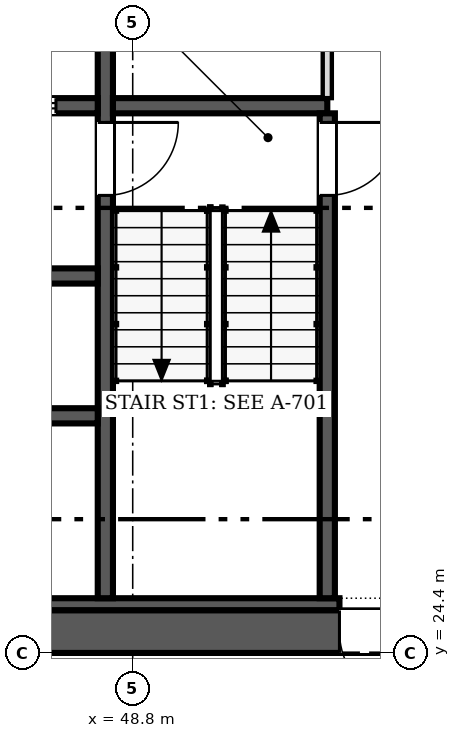
"""IFC4 building model, lengths in metres.
Left out: names, types, materials, properties, quantities, classifications, styles, units other than length and angle.
Written with IfcOpenShell. Run it as: python <this file> out.ifc"""

import sys

from ifc_helpers import new_model, si_unit, direction, frame, frame_2d, origin, place, context, subcontext, project, spatial, rectangle, extrude, source, transform, mapped, element, fill, save


model = new_model("IFC4")
c1 = context("Model", 3, precision=1e-05, world=origin(), true_north=direction((0.0, 1.0)))
c2 = subcontext(c1, "Body", "Model", "MODEL_VIEW")
j1 = project(units=[si_unit("LENGTHUNIT", "METRE"), si_unit("PLANEANGLEUNIT", "RADIAN")], contexts=[c1])
p1 = place(None, origin())
s1 = spatial("IfcSite", under=j1, at=p1, CompositionType="ELEMENT")
p2 = place(p1, origin())
s2 = spatial("IfcBuilding", under=s1, at=p2, CompositionType="ELEMENT")
p3 = place(p2, frame((0.0, 0.0, 139.2)))
s3 = spatial("IfcBuildingStorey", under=s2, at=p3, CompositionType="ELEMENT", Elevation=139.2)
p4 = place(p3, frame((54.9, 24.75, 0.0), z_axis=(0.0, 0.0, 1.0), x_axis=(-1.0, 0.0, 0.0)))
e1 = element("IfcWall", 1, at=p4, inside=s3, PredefinedType="SHEAR", context=c2, shape_type="SweptSolid", body=[
    extrude(rectangle(XDim=24.4, YDim=0.7, at=frame_2d((12.2, 0.0))), origin(), (0.0, 0.0, 1.0), 3.8),
])
m1 = source(origin(), c2, "Body", "SweptSolid", [
    extrude(rectangle(XDim=1.2, YDim=2.1, at=frame_2d((0.6, 1.05))), frame((0.0, 0.36, 0.0), z_axis=(0.0, -1.0, 0.0), x_axis=(1.0, 0.0, 0.0)), (0.0, 0.0, 1.0), 0.72),
])
p5 = place(p4, frame((1.5, 0.0, 0.0)))
e2 = element("IfcOpeningElement", 2, at=p5, cuts=e1, PredefinedType="OPENING", context=c2, shape_type="MappedRepresentation", body=[
    mapped(m1, transform((0.0, 0.0, 0.0), scale=1.0)),
])
p6 = place(p3, frame((31.2, 25.2, 0.0), z_axis=(0.0, 0.0, 1.0), x_axis=(1.0, 0.0, 0.0)))
e3 = element("IfcWall", 3, at=p6, inside=s3, PredefinedType="SOLIDWALL", context=c2, shape_type="SweptSolid", body=[
    extrude(rectangle(XDim=21.0, YDim=0.2, at=frame_2d((10.5, 0.0))), origin(), (0.0, 0.0, 1.0), 3.8),
])
p7 = place(p3, frame((48.35, 36.35, 0.0), z_axis=(0.0, 0.0, 1.0), x_axis=(0.0, -1.0, 0.0)))
e4 = element("IfcWall", 4, at=p7, inside=s3, PredefinedType="SOLIDWALL", context=c2, shape_type="SweptSolid", body=[
    extrude(rectangle(XDim=11.05, YDim=0.25, at=frame_2d((5.525, 0.0))), origin(), (0.0, 0.0, 1.0), 3.8),
])
m2 = source(origin(), c2, "Body", "SweptSolid", [
    extrude(rectangle(XDim=1.2, YDim=2.1, at=frame_2d((0.6, 1.05))), frame((0.0, 0.135, 0.0), z_axis=(0.0, -1.0, 0.0), x_axis=(1.0, 0.0, 0.0)), (0.0, 0.0, 1.0), 0.27),
])
p8 = place(p7, frame((3.225, 0.0, 0.0)))
e5 = element("IfcOpeningElement", 5, at=p8, cuts=e4, PredefinedType="OPENING", context=c2, shape_type="MappedRepresentation", body=[
    mapped(m2, transform((0.0, 0.0, 0.0), scale=1.0)),
])
p9 = place(p3, frame((48.225, 33.4, 0.0), z_axis=(0.0, 0.0, 1.0), x_axis=(-1.0, 0.0, 0.0)))
e6 = element("IfcWall", 6, at=p9, inside=s3, PredefinedType="SOLIDWALL", context=c2, shape_type="SweptSolid", body=[
    extrude(rectangle(XDim=5.275, YDim=0.25, at=frame_2d((2.638, 0.0))), origin(), (0.0, 0.0, 1.0), 3.8),
])
p10 = place(p9, frame((3.512, 0.0, 0.0)))
e7 = element("IfcOpeningElement", 7, at=p10, cuts=e6, PredefinedType="OPENING", context=c2, shape_type="MappedRepresentation", body=[
    mapped(m2, transform((0.0, 0.0, 0.0), scale=1.0)),
])
p11 = place(p9, frame((0.688, 0.0, 0.0)))
e8 = element("IfcOpeningElement", 8, at=p11, cuts=e6, PredefinedType="OPENING", context=c2, shape_type="MappedRepresentation", body=[
    mapped(m2, transform((0.0, 0.0, 0.0), scale=1.0)),
])
p12 = place(p3, frame((48.475, 33.4, 0.0), z_axis=(0.0, 0.0, 1.0), x_axis=(1.0, 0.0, 0.0)))
e9 = element("IfcWall", 9, at=p12, inside=s3, PredefinedType="SOLIDWALL", context=c2, shape_type="SweptSolid", body=[
    extrude(rectangle(XDim=3.525, YDim=0.25, at=frame_2d((1.762, 0.0))), origin(), (0.0, 0.0, 1.0), 3.8),
])
p13 = place(p3, frame((52.0, 25.3, 0.0), z_axis=(0.0, 0.0, 1.0), x_axis=(0.0, 1.0, 0.0)))
e10 = element("IfcWall", 10, at=p13, inside=s3, PredefinedType="SOLIDWALL", context=c2, shape_type="SweptSolid", body=[
    extrude(rectangle(XDim=7.975, YDim=0.25, at=frame_2d((3.987, 0.0))), origin(), (0.0, 0.0, 1.0), 3.8),
])
p14 = place(p13, frame((6.625, 0.0, 0.0)))
e11 = element("IfcOpeningElement", 11, at=p14, cuts=e10, PredefinedType="OPENING", context=c2, shape_type="MappedRepresentation", body=[
    mapped(m2, transform((0.0, 0.0, 0.0), scale=1.0)),
])
for number, where, z_axis, x_axis in (
    (12, (42.95, 28.3, 0.0), (0.0, 0.0, 1.0), (1.0, 0.0, 0.0)),
    (13, (42.95, 30.6, 0.0), (0.0, 0.0, 1.0), (1.0, 0.0, 0.0)),
):
    element("IfcWall", number, at=place(p3, frame(where, z_axis=z_axis, x_axis=x_axis)), inside=s3, PredefinedType="SOLIDWALL", context=c2, shape_type="SweptSolid", body=[
        extrude(rectangle(XDim=5.275, YDim=0.25, at=frame_2d((2.638, 0.0))), origin(), (0.0, 0.0, 1.0), 3.8),
    ])
p15 = place(p3, frame((52.0, 33.525, 0.0), z_axis=(0.0, 0.0, 1.0), x_axis=(0.0, 1.0, 0.0)))
e14 = element("IfcWall", 14, at=p15, inside=s3, PredefinedType="PARTITIONING", context=c2, shape_type="SweptSolid", body=[
    extrude(rectangle(XDim=6.275, YDim=0.15, at=frame_2d((3.138, 0.0))), origin(), (0.0, 0.0, 1.0), 3.6),
])
m3 = source(origin(), c2, "Body", "SweptSolid", [
    extrude(rectangle(XDim=0.9, YDim=2.1, at=frame_2d((0.45, 1.05))), frame((0.0, 0.085, 0.0), z_axis=(0.0, -1.0, 0.0), x_axis=(1.0, 0.0, 0.0)), (0.0, 0.0, 1.0), 0.17),
])
p16 = place(p15, frame((1.025, 0.0, 0.0)))
e15 = element("IfcOpeningElement", 15, at=p16, cuts=e14, PredefinedType="OPENING", context=c2, shape_type="MappedRepresentation", body=[
    mapped(m3, transform((0.0, 0.0, 0.0), scale=1.0)),
])
m4 = source(origin(), c2, "Body", "SweptSolid", [
    extrude(rectangle(XDim=1.2, YDim=2.1, at=frame_2d((0.6, 1.05))), frame((0.0, 0.025, 0.0), z_axis=(0.0, -1.0, 0.0), x_axis=(1.0, 0.0, 0.0)), (0.0, 0.0, 1.0), 0.05),
])
p17 = place(p5, origin())
e16 = element("IfcDoor", 16, at=p17, inside=s3, OperationType="SINGLE_SWING_LEFT", PredefinedType="DOOR", context=c2, shape_type="MappedRepresentation", body=[
    mapped(m4, transform((0.0, 0.0, 0.0), scale=1.0)),
])
fill(e2, e16)
p18 = place(p8, origin())
e17 = element("IfcDoor", 17, at=p18, inside=s3, OperationType="SINGLE_SWING_LEFT", PredefinedType="DOOR", context=c2, shape_type="MappedRepresentation", body=[
    mapped(m4, transform((0.0, 0.0, 0.0), scale=1.0)),
])
fill(e5, e17)
p19 = place(p11, origin())
e18 = element("IfcDoor", 18, at=p19, inside=s3, OperationType="DOUBLE_DOOR_SLIDING", PredefinedType="DOOR", context=c2, shape_type="MappedRepresentation", body=[
    mapped(m4, transform((0.0, 0.0, 0.0), scale=1.0)),
])
fill(e8, e18)
p20 = place(p14, origin())
e19 = element("IfcDoor", 19, at=p20, inside=s3, OperationType="SINGLE_SWING_RIGHT", PredefinedType="DOOR", context=c2, shape_type="MappedRepresentation", body=[
    mapped(m4, transform((0.0, 0.0, 0.0), scale=1.0)),
])
fill(e11, e19)
save(model, sys.argv[1])
